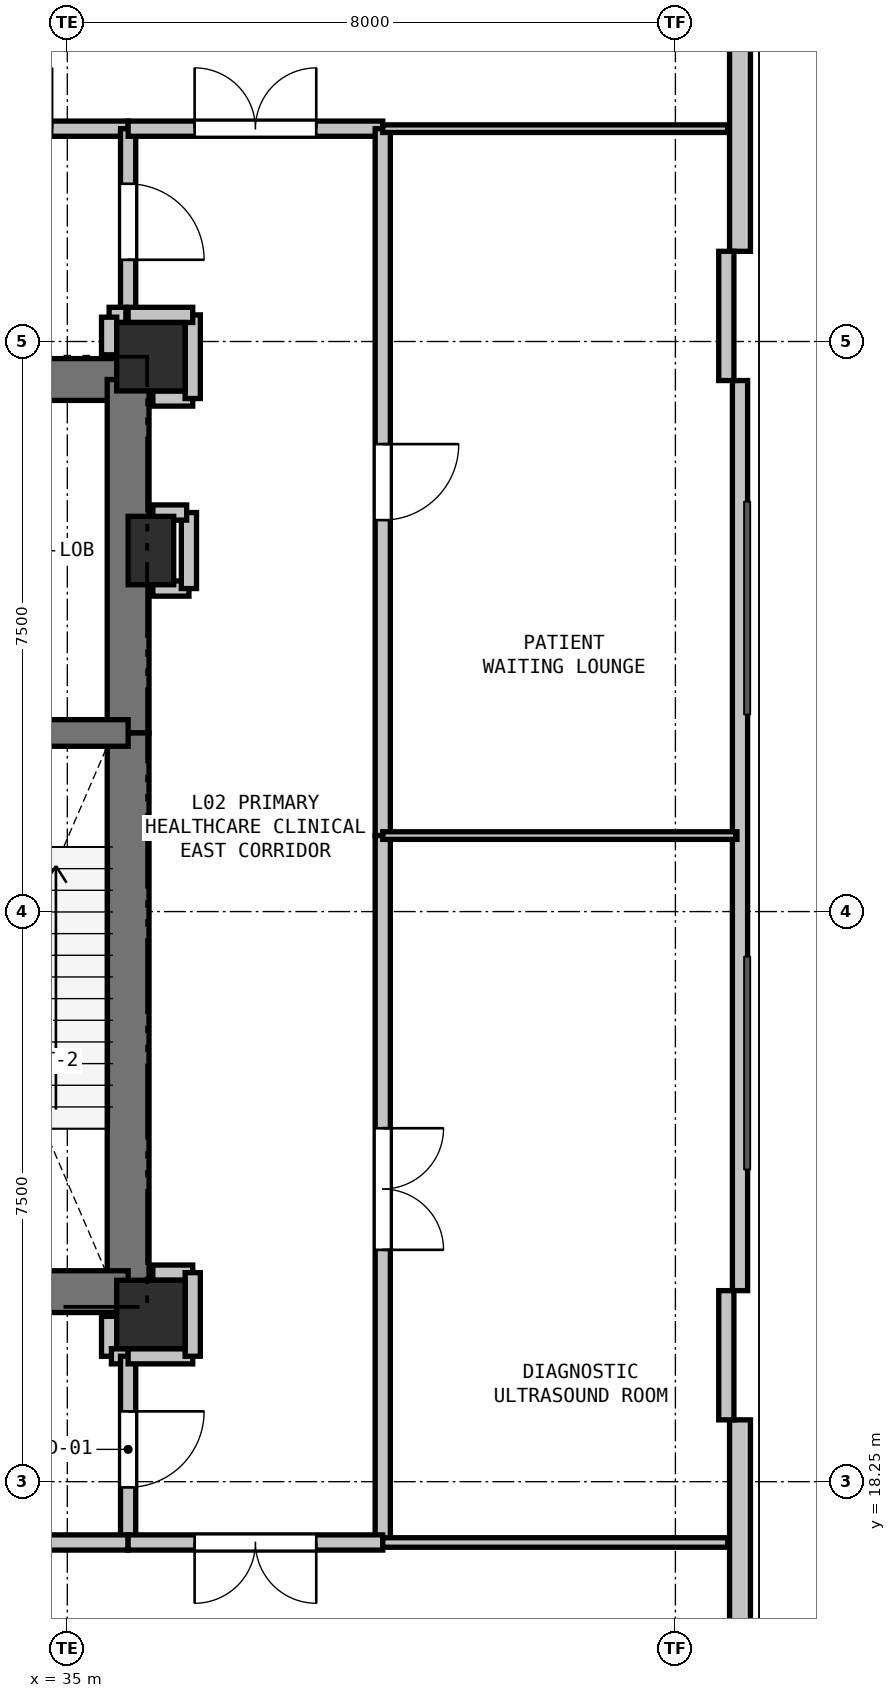
"""IFC4 building model, lengths in metres.
Left out: names, types, materials, properties, quantities, classifications, styles, units other than length and angle.
Written with IfcOpenShell. Run it as: python <this file> out.ifc"""

import sys

from ifc_helpers import new_model, si_unit, direction, frame, frame_2d, origin, origin_2d, place, context, subcontext, project, spatial, rectangle, extrude, element, fill, save


model = new_model("IFC4")
c1 = context("Model", 3, precision=1e-05, world=origin(), true_north=direction((0.0, 1.0)))
c2 = subcontext(c1, "Body", "Model", "MODEL_VIEW")
j1 = project(units=[si_unit("LENGTHUNIT", "METRE"), si_unit("PLANEANGLEUNIT", "RADIAN")], contexts=[c1])
p1 = place(None, origin())
s1 = spatial("IfcSite", under=j1, at=p1, CompositionType="ELEMENT")
p2 = place(p1, origin())
s2 = spatial("IfcBuilding", under=s1, at=p2, CompositionType="ELEMENT")
p3 = place(p2, frame((0.0, 0.0, 9.6)))
s3 = spatial("IfcBuildingStorey", under=s2, at=p3, CompositionType="ELEMENT", Elevation=9.6)
for number, where, z_axis, x_axis in (
    (1, (36.1, 33.05, 0.0), (0.0, 0.0, 1.0), (1.0, 0.0, 0.0)),
    (2, (36.1, 20.45, 0.0), (0.0, 0.0, 1.0), (1.0, 0.0, 0.0)),
):
    element("IfcColumn", number, at=place(p3, frame(where, z_axis=z_axis, x_axis=x_axis)), inside=s3, PredefinedType="COLUMN", context=c2, shape_type="SweptSolid", body=[
        extrude(rectangle(XDim=0.9, YDim=0.9, at=origin_2d()), origin(), (0.0, 0.0, 1.0), 4.8),
    ])
p4 = place(p3, frame((36.1, 30.5, 0.0), z_axis=(0.0, 0.0, 1.0), x_axis=(1.0, 0.0, 0.0)))
e3 = element("IfcColumn", 3, at=p4, inside=s3, PredefinedType="PILASTER", context=c2, shape_type="SweptSolid", body=[
    extrude(rectangle(XDim=0.6, YDim=0.9, at=origin_2d()), origin(), (0.0, 0.0, 1.0), 4.8),
])
p5 = place(p3, frame((43.85, 47.11, 0.0), z_axis=(0.0, 0.0, 1.0), x_axis=(0.0, -1.0, 0.0)))
e4 = element("IfcWall", 4, at=p5, inside=s3, PredefinedType="SOLIDWALL", context=c2, shape_type="SweptSolid", body=[
    extrude(rectangle(XDim=12.673, YDim=0.275, at=frame_2d((6.336, 0.0))), origin(), (0.0, 0.0, 1.0), 4.1),
])
p6 = place(p5, frame((7.973, 0.0, 0.9)))
e5 = element("IfcOpeningElement", 5, at=p6, cuts=e4, PredefinedType="OPENING", context=c2, shape_type="SweptSolid", body=[
    extrude(rectangle(XDim=1.6, YDim=1.8, at=frame_2d((0.8, 0.9))), frame((0.0, 0.147, 0.0), z_axis=(0.0, -1.0, 0.0), x_axis=(1.0, 0.0, 0.0)), (0.0, 0.0, 1.0), 0.295),
])
p7 = place(p3, frame((43.85, 32.737, 0.0), z_axis=(0.0, 0.0, 1.0), x_axis=(0.0, -1.0, 0.0)))
e6 = element("IfcWall", 6, at=p7, inside=s3, PredefinedType="PARAPET", context=c2, shape_type="SweptSolid", body=[
    extrude(rectangle(XDim=11.973, YDim=0.2, at=frame_2d((5.987, 0.0))), origin(), (0.0, 0.0, 1.0), 0.2),
])
p8 = place(p3, frame((43.85, 19.063, 0.0), z_axis=(0.0, 0.0, 1.0), x_axis=(0.0, -1.0, 0.0)))
e7 = element("IfcWall", 7, at=p8, inside=s3, PredefinedType="SOLIDWALL", context=c2, shape_type="SweptSolid", body=[
    extrude(rectangle(XDim=12.673, YDim=0.275, at=frame_2d((6.336, 0.0))), origin(), (0.0, 0.0, 1.0), 4.1),
])
p9 = place(p8, frame((2.988, 0.0, 0.9)))
e8 = element("IfcOpeningElement", 8, at=p9, cuts=e7, PredefinedType="OPENING", context=c2, shape_type="SweptSolid", body=[
    extrude(rectangle(XDim=2.0, YDim=1.8, at=frame_2d((1.0, 0.9))), frame((0.0, 0.147, 0.0), z_axis=(0.0, -1.0, 0.0), x_axis=(1.0, 0.0, 0.0)), (0.0, 0.0, 1.0), 0.295),
])
for number, where, z_axis, x_axis in (
    (9, (43.67, 34.437, 0.0), (0.0, 0.0, 1.0), (0.0, -1.0, 0.0)),
    (10, (43.67, 20.763, 0.0), (0.0, 0.0, 1.0), (0.0, -1.0, 0.0)),
):
    element("IfcWall", number, at=place(p3, frame(where, z_axis=z_axis, x_axis=x_axis)), inside=s3, PredefinedType="PARAPET", context=c2, shape_type="SweptSolid", body=[
        extrude(rectangle(XDim=1.7, YDim=0.2, at=frame_2d((0.85, 0.0))), origin(), (0.0, 0.0, 1.0), 4.1),
    ])
p10 = place(p3, frame((32.35, 32.75, 0.0), z_axis=(0.0, 0.0, 1.0), x_axis=(1.0, 0.0, 0.0)))
e11 = element("IfcWall", 11, at=p10, inside=s3, PredefinedType="SHEAR", context=c2, shape_type="SweptSolid", body=[
    extrude(rectangle(XDim=3.45, YDim=0.55, at=frame_2d((1.725, 0.0))), origin(), (0.0, 0.0, 1.0), 4.48),
])
p11 = place(p10, frame((0.65, 0.0, 0.0)))
e12 = element("IfcOpeningElement", 12, at=p11, cuts=e11, PredefinedType="OPENING", context=c2, shape_type="SweptSolid", body=[
    extrude(rectangle(XDim=1.15, YDim=2.15, at=frame_2d((0.575, 1.075))), frame((0.0, 0.285, 0.0), z_axis=(0.0, -1.0, 0.0), x_axis=(1.0, 0.0, 0.0)), (0.0, 0.0, 1.0), 0.57),
])
p12 = place(p3, frame((35.8, 32.75, 0.0), z_axis=(0.0, 0.0, 1.0), x_axis=(0.0, -1.0, 0.0)))
e13 = element("IfcWall", 13, at=p12, inside=s3, PredefinedType="SHEAR", context=c2, shape_type="SweptSolid", body=[
    extrude(rectangle(XDim=4.65, YDim=0.55, at=frame_2d((2.325, 0.0))), origin(), (0.0, 0.0, 1.0), 4.48),
])
p13 = place(p3, frame((35.8, 28.1, 0.0), z_axis=(0.0, 0.0, 1.0), x_axis=(0.0, -1.0, 0.0)))
e14 = element("IfcWall", 14, at=p13, inside=s3, PredefinedType="SHEAR", context=c2, shape_type="SweptSolid", body=[
    extrude(rectangle(XDim=7.35, YDim=0.55, at=frame_2d((3.675, 0.0))), origin(), (0.0, 0.0, 1.0), 4.48),
])
p14 = place(p3, frame((35.8, 20.75, 0.0), z_axis=(0.0, 0.0, 1.0), x_axis=(-1.0, 0.0, 0.0)))
e15 = element("IfcWall", 15, at=p14, inside=s3, PredefinedType="SHEAR", context=c2, shape_type="SweptSolid", body=[
    extrude(rectangle(XDim=3.45, YDim=0.55, at=frame_2d((1.725, 0.0))), origin(), (0.0, 0.0, 1.0), 4.48),
])
p15 = place(p3, frame((32.35, 28.1, 0.0), z_axis=(0.0, 0.0, 1.0), x_axis=(1.0, 0.0, 0.0)))
e16 = element("IfcWall", 16, at=p15, inside=s3, PredefinedType="SHEAR", context=c2, shape_type="SweptSolid", body=[
    extrude(rectangle(XDim=3.45, YDim=0.35, at=frame_2d((1.725, 0.0))), origin(), (0.0, 0.0, 1.0), 4.48),
])
p16 = place(p15, frame((1.15, 0.0, 0.0)))
e17 = element("IfcOpeningElement", 17, at=p16, cuts=e16, PredefinedType="OPENING", context=c2, shape_type="SweptSolid", body=[
    extrude(rectangle(XDim=1.15, YDim=2.15, at=frame_2d((0.575, 1.075))), frame((0.0, 0.185, 0.0), z_axis=(0.0, -1.0, 0.0), x_axis=(1.0, 0.0, 0.0)), (0.0, 0.0, 1.0), 0.37),
])
p17 = place(p3, frame((35.55, 20.425, 0.0), z_axis=(0.0, 0.0, 1.0), x_axis=(0.0, -1.0, 0.0)))
e18 = element("IfcWall", 18, at=p17, inside=s3, PredefinedType="PARTITIONING", context=c2, shape_type="SweptSolid", body=[
    extrude(rectangle(XDim=0.525, YDim=0.2, at=frame_2d((0.263, 0.0))), origin(), (0.0, 0.0, 1.0), 3.928),
])
p18 = place(p3, frame((35.58, 19.9, 0.0), z_axis=(0.0, 0.0, 1.0), x_axis=(1.0, 0.0, 0.0)))
e19 = element("IfcWall", 19, at=p18, inside=s3, PredefinedType="PARTITIONING", context=c2, shape_type="SweptSolid", body=[
    extrude(rectangle(XDim=0.22, YDim=0.2, at=frame_2d((0.11, 0.0))), origin(), (0.0, 0.0, 1.0), 4.48),
])
p19 = place(p3, frame((35.8, 19.9, 0.0), z_axis=(0.0, 0.0, 1.0), x_axis=(0.0, -1.0, 0.0)))
e20 = element("IfcWall", 20, at=p19, inside=s3, PredefinedType="PARTITIONING", context=c2, shape_type="SweptSolid", body=[
    extrude(rectangle(XDim=2.45, YDim=0.2, at=frame_2d((1.225, 0.0))), origin(), (0.0, 0.0, 1.0), 4.48),
])
p20 = place(p19, frame((0.725, 0.0, 0.0)))
e21 = element("IfcOpeningElement", 21, at=p20, cuts=e20, PredefinedType="OPENING", context=c2, shape_type="SweptSolid", body=[
    extrude(rectangle(XDim=1.0, YDim=2.15, at=frame_2d((0.5, 1.075))), frame((0.0, 0.11, 0.0), z_axis=(0.0, -1.0, 0.0), x_axis=(1.0, 0.0, 0.0)), (0.0, 0.0, 1.0), 0.22),
])
p21 = place(p3, frame((35.8, 17.45, 0.0), z_axis=(0.0, 0.0, 1.0), x_axis=(-1.0, 0.0, 0.0)))
e22 = element("IfcWall", 22, at=p21, inside=s3, PredefinedType="PARTITIONING", context=c2, shape_type="SweptSolid", body=[
    extrude(rectangle(XDim=4.3, YDim=0.2, at=frame_2d((2.15, 0.0))), origin(), (0.0, 0.0, 1.0), 4.48),
])
p22 = place(p21, frame((1.35, 0.0, 0.0)))
e23 = element("IfcOpeningElement", 23, at=p22, cuts=e22, PredefinedType="OPENING", context=c2, shape_type="SweptSolid", body=[
    extrude(rectangle(XDim=1.6, YDim=2.2, at=frame_2d((0.8, 1.1))), frame((0.0, 0.11, 0.0), z_axis=(0.0, -1.0, 0.0), x_axis=(1.0, 0.0, 0.0)), (0.0, 0.0, 1.0), 0.22),
])
p23 = place(p3, frame((32.2, 36.05, 0.0), z_axis=(0.0, 0.0, 1.0), x_axis=(1.0, 0.0, 0.0)))
e24 = element("IfcWall", 24, at=p23, inside=s3, PredefinedType="PARTITIONING", context=c2, shape_type="SweptSolid", body=[
    extrude(rectangle(XDim=3.6, YDim=0.2, at=frame_2d((1.8, 0.0))), origin(), (0.0, 0.0, 1.0), 4.48),
])
p24 = place(p23, frame((1.0, 0.0, 0.0)))
e25 = element("IfcOpeningElement", 25, at=p24, cuts=e24, PredefinedType="OPENING", context=c2, shape_type="SweptSolid", body=[
    extrude(rectangle(XDim=1.6, YDim=2.2, at=frame_2d((0.8, 1.1))), frame((0.0, 0.11, 0.0), z_axis=(0.0, -1.0, 0.0), x_axis=(1.0, 0.0, 0.0)), (0.0, 0.0, 1.0), 0.22),
])
p25 = place(p3, frame((35.8, 36.05, 0.0), z_axis=(0.0, 0.0, 1.0), x_axis=(0.0, -1.0, 0.0)))
e26 = element("IfcWall", 26, at=p25, inside=s3, PredefinedType="PARTITIONING", context=c2, shape_type="SweptSolid", body=[
    extrude(rectangle(XDim=2.45, YDim=0.2, at=frame_2d((1.225, 0.0))), origin(), (0.0, 0.0, 1.0), 4.48),
])
p26 = place(p25, frame((0.725, 0.0, 0.0)))
e27 = element("IfcOpeningElement", 27, at=p26, cuts=e26, PredefinedType="OPENING", context=c2, shape_type="SweptSolid", body=[
    extrude(rectangle(XDim=1.0, YDim=2.15, at=frame_2d((0.5, 1.075))), frame((0.0, 0.11, 0.0), z_axis=(0.0, -1.0, 0.0), x_axis=(1.0, 0.0, 0.0)), (0.0, 0.0, 1.0), 0.22),
])
p27 = place(p3, frame((35.77, 33.6, 0.0), z_axis=(0.0, 0.0, 1.0), x_axis=(-1.0, 0.0, 0.0)))
e28 = element("IfcWall", 28, at=p27, inside=s3, PredefinedType="PARTITIONING", context=c2, shape_type="SweptSolid", body=[
    extrude(rectangle(XDim=0.22, YDim=0.2, at=frame_2d((0.11, 0.0))), origin(), (0.0, 0.0, 1.0), 4.48),
])
p28 = place(p3, frame((35.55, 33.57, 0.0), z_axis=(0.0, 0.0, 1.0), x_axis=(0.0, -1.0, 0.0)))
e29 = element("IfcWall", 29, at=p28, inside=s3, PredefinedType="PARTITIONING", context=c2, shape_type="SweptSolid", body=[
    extrude(rectangle(XDim=0.495, YDim=0.2, at=frame_2d((0.248, 0.0))), origin(), (0.0, 0.0, 1.0), 3.928),
])
p29 = place(p3, frame((36.65, 21.0, 0.0), z_axis=(0.0, 0.0, 1.0), x_axis=(-1.0, 0.0, 0.0)))
e30 = element("IfcWall", 30, at=p29, inside=s3, PredefinedType="PARTITIONING", context=c2, shape_type="SweptSolid", body=[
    extrude(rectangle(XDim=0.525, YDim=0.2, at=frame_2d((0.262, 0.0))), origin(), (0.0, 0.0, 1.0), 3.928),
])
p30 = place(p3, frame((36.125, 30.0, 0.0), z_axis=(0.0, 0.0, 1.0), x_axis=(1.0, 0.0, 0.0)))
e31 = element("IfcWall", 31, at=p30, inside=s3, PredefinedType="PARTITIONING", context=c2, shape_type="SweptSolid", body=[
    extrude(rectangle(XDim=0.475, YDim=0.2, at=frame_2d((0.238, 0.0))), origin(), (0.0, 0.0, 1.0), 3.928),
])
p31 = place(p3, frame((36.6, 30.0, 0.0), z_axis=(0.0, 0.0, 1.0), x_axis=(0.0, 1.0, 0.0)))
e32 = element("IfcWall", 32, at=p31, inside=s3, PredefinedType="PARTITIONING", context=c2, shape_type="SweptSolid", body=[
    extrude(rectangle(XDim=1.0, YDim=0.2, at=frame_2d((0.5, 0.0))), origin(), (0.0, 0.0, 1.0), 4.48),
])
p32 = place(p3, frame((36.57, 31.0, 0.0), z_axis=(0.0, 0.0, 1.0), x_axis=(-1.0, 0.0, 0.0)))
e33 = element("IfcWall", 33, at=p32, inside=s3, PredefinedType="PARTITIONING", context=c2, shape_type="SweptSolid", body=[
    extrude(rectangle(XDim=0.445, YDim=0.2, at=frame_2d((0.223, 0.0))), origin(), (0.0, 0.0, 1.0), 3.928),
])
p33 = place(p3, frame((36.125, 32.5, 0.0), z_axis=(0.0, 0.0, 1.0), x_axis=(1.0, 0.0, 0.0)))
e34 = element("IfcWall", 34, at=p33, inside=s3, PredefinedType="PARTITIONING", context=c2, shape_type="SweptSolid", body=[
    extrude(rectangle(XDim=0.525, YDim=0.2, at=frame_2d((0.262, 0.0))), origin(), (0.0, 0.0, 1.0), 3.928),
])
p34 = place(p3, frame((36.65, 32.5, 0.0), z_axis=(0.0, 0.0, 1.0), x_axis=(0.0, 1.0, 0.0)))
e35 = element("IfcWall", 35, at=p34, inside=s3, PredefinedType="PARTITIONING", context=c2, shape_type="SweptSolid", body=[
    extrude(rectangle(XDim=1.1, YDim=0.2, at=frame_2d((0.55, 0.0))), origin(), (0.0, 0.0, 1.0), 3.777),
])
p35 = place(p3, frame((36.65, 33.6, 0.0), z_axis=(0.0, 0.0, 1.0), x_axis=(-1.0, 0.0, 0.0)))
e36 = element("IfcWall", 36, at=p35, inside=s3, PredefinedType="PARTITIONING", context=c2, shape_type="SweptSolid", body=[
    extrude(rectangle(XDim=0.85, YDim=0.2, at=frame_2d((0.425, 0.0))), origin(), (0.0, 0.0, 1.0), 3.777),
])
p36 = place(p3, frame((35.8, 36.05, 0.0), z_axis=(0.0, 0.0, 1.0), x_axis=(1.0, 0.0, 0.0)))
e37 = element("IfcWall", 37, at=p36, inside=s3, PredefinedType="PARTITIONING", context=c2, shape_type="SweptSolid", body=[
    extrude(rectangle(XDim=3.35, YDim=0.2, at=frame_2d((1.675, 0.0))), origin(), (0.0, 0.0, 1.0), 3.777),
])
p37 = place(p36, frame((0.875, 0.0, 0.0)))
e38 = element("IfcOpeningElement", 38, at=p37, cuts=e37, PredefinedType="OPENING", context=c2, shape_type="SweptSolid", body=[
    extrude(rectangle(XDim=1.6, YDim=2.2, at=frame_2d((0.8, 1.1))), frame((0.0, 0.11, 0.0), z_axis=(0.0, -1.0, 0.0), x_axis=(1.0, 0.0, 0.0)), (0.0, 0.0, 1.0), 0.22),
])
p38 = place(p3, frame((39.15, 36.05, 0.0), z_axis=(0.0, 0.0, 1.0), x_axis=(0.0, -1.0, 0.0)))
e39 = element("IfcWall", 39, at=p38, inside=s3, PredefinedType="PARTITIONING", context=c2, shape_type="SweptSolid", body=[
    extrude(rectangle(XDim=9.3, YDim=0.2, at=frame_2d((4.65, 0.0))), origin(), (0.0, 0.0, 1.0), 4.48),
])
p39 = place(p38, frame((4.15, 0.0, 0.0)))
e40 = element("IfcOpeningElement", 40, at=p39, cuts=e39, PredefinedType="OPENING", context=c2, shape_type="SweptSolid", body=[
    extrude(rectangle(XDim=1.0, YDim=2.15, at=frame_2d((0.5, 1.075))), frame((0.0, 0.11, 0.0), z_axis=(0.0, -1.0, 0.0), x_axis=(1.0, 0.0, 0.0)), (0.0, 0.0, 1.0), 0.22),
])
p40 = place(p3, frame((39.15, 26.75, 0.0), z_axis=(0.0, 0.0, 1.0), x_axis=(0.0, -1.0, 0.0)))
e41 = element("IfcWall", 41, at=p40, inside=s3, PredefinedType="PARTITIONING", context=c2, shape_type="SweptSolid", body=[
    extrude(rectangle(XDim=9.3, YDim=0.2, at=frame_2d((4.65, 0.0))), origin(), (0.0, 0.0, 1.0), 4.48),
])
p41 = place(p40, frame((3.85, 0.0, 0.0)))
e42 = element("IfcOpeningElement", 42, at=p41, cuts=e41, PredefinedType="OPENING", context=c2, shape_type="SweptSolid", body=[
    extrude(rectangle(XDim=1.6, YDim=2.2, at=frame_2d((0.8, 1.1))), frame((0.0, 0.11, 0.0), z_axis=(0.0, -1.0, 0.0), x_axis=(1.0, 0.0, 0.0)), (0.0, 0.0, 1.0), 0.22),
])
p42 = place(p3, frame((39.15, 17.45, 0.0), z_axis=(0.0, 0.0, 1.0), x_axis=(-1.0, 0.0, 0.0)))
e43 = element("IfcWall", 43, at=p42, inside=s3, PredefinedType="PARTITIONING", context=c2, shape_type="SweptSolid", body=[
    extrude(rectangle(XDim=3.35, YDim=0.2, at=frame_2d((1.675, 0.0))), origin(), (0.0, 0.0, 1.0), 3.777),
])
p43 = place(p42, frame((0.875, 0.0, 0.0)))
e44 = element("IfcOpeningElement", 44, at=p43, cuts=e43, PredefinedType="OPENING", context=c2, shape_type="SweptSolid", body=[
    extrude(rectangle(XDim=1.6, YDim=2.2, at=frame_2d((0.8, 1.1))), frame((0.0, 0.11, 0.0), z_axis=(0.0, -1.0, 0.0), x_axis=(1.0, 0.0, 0.0)), (0.0, 0.0, 1.0), 0.22),
])
p44 = place(p3, frame((35.8, 19.9, 0.0), z_axis=(0.0, 0.0, 1.0), x_axis=(1.0, 0.0, 0.0)))
e45 = element("IfcWall", 45, at=p44, inside=s3, PredefinedType="PARTITIONING", context=c2, shape_type="SweptSolid", body=[
    extrude(rectangle(XDim=0.85, YDim=0.2, at=frame_2d((0.425, 0.0))), origin(), (0.0, 0.0, 1.0), 3.777),
])
p45 = place(p3, frame((36.65, 19.9, 0.0), z_axis=(0.0, 0.0, 1.0), x_axis=(0.0, 1.0, 0.0)))
e46 = element("IfcWall", 46, at=p45, inside=s3, PredefinedType="PARTITIONING", context=c2, shape_type="SweptSolid", body=[
    extrude(rectangle(XDim=1.1, YDim=0.2, at=frame_2d((0.55, 0.0))), origin(), (0.0, 0.0, 1.0), 4.48),
])
p46 = place(p3, frame((43.688, 36.05, 0.0), z_axis=(0.0, 0.0, 1.0), x_axis=(-1.0, 0.0, 0.0)))
e47 = element("IfcWall", 47, at=p46, inside=s3, PredefinedType="PARTITIONING", context=c2, shape_type="SweptSolid", body=[
    extrude(rectangle(XDim=4.539, YDim=0.1, at=frame_2d((2.269, 0.0))), origin(), (0.0, 0.0, 1.0), 4.09),
])
p47 = place(p3, frame((43.81, 26.75, 0.0), z_axis=(0.0, 0.0, 1.0), x_axis=(-1.0, 0.0, 0.0)))
e48 = element("IfcWall", 48, at=p47, inside=s3, PredefinedType="PARTITIONING", context=c2, shape_type="SweptSolid", body=[
    extrude(rectangle(XDim=4.66, YDim=0.1, at=frame_2d((2.33, 0.0))), origin(), (0.0, 0.0, 1.0), 4.09),
])
p48 = place(p3, frame((43.688, 17.45, 0.0), z_axis=(0.0, 0.0, 1.0), x_axis=(-1.0, 0.0, 0.0)))
e49 = element("IfcWall", 49, at=p48, inside=s3, PredefinedType="PARTITIONING", context=c2, shape_type="SweptSolid", body=[
    extrude(rectangle(XDim=4.539, YDim=0.125, at=frame_2d((2.269, 0.0))), origin(), (0.0, 0.0, 1.0), 4.09),
])
p49 = place(p20, origin())
e50 = element("IfcDoor", 50, at=p49, inside=s3, OperationType="SINGLE_SWING_LEFT", PredefinedType="DOOR", context=c2, shape_type="SweptSolid", body=[
    extrude(rectangle(XDim=1.0, YDim=2.15, at=frame_2d((0.5, 1.075))), frame((0.0, 0.025, 0.0), z_axis=(0.0, -1.0, 0.0), x_axis=(1.0, 0.0, 0.0)), (0.0, 0.0, 1.0), 0.05),
])
fill(e21, e50)
p50 = place(p26, origin())
e51 = element("IfcDoor", 51, at=p50, inside=s3, OperationType="SINGLE_SWING_RIGHT", PredefinedType="DOOR", context=c2, shape_type="SweptSolid", body=[
    extrude(rectangle(XDim=1.0, YDim=2.15, at=frame_2d((0.5, 1.075))), frame((0.0, 0.025, 0.0), z_axis=(0.0, -1.0, 0.0), x_axis=(1.0, 0.0, 0.0)), (0.0, 0.0, 1.0), 0.05),
])
fill(e27, e51)
p51 = place(p37, origin())
e52 = element("IfcDoor", 52, at=p51, inside=s3, OperationType="DOUBLE_DOOR_SINGLE_SWING", PredefinedType="DOOR", context=c2, shape_type="SweptSolid", body=[
    extrude(rectangle(XDim=1.6, YDim=2.2, at=frame_2d((0.8, 1.1))), frame((0.0, 0.025, 0.0), z_axis=(0.0, -1.0, 0.0), x_axis=(1.0, 0.0, 0.0)), (0.0, 0.0, 1.0), 0.05),
])
fill(e38, e52)
p52 = place(p39, origin())
e53 = element("IfcDoor", 53, at=p52, inside=s3, OperationType="SINGLE_SWING_LEFT", PredefinedType="DOOR", context=c2, shape_type="SweptSolid", body=[
    extrude(rectangle(XDim=1.0, YDim=2.15, at=frame_2d((0.5, 1.075))), frame((0.0, 0.025, 0.0), z_axis=(0.0, -1.0, 0.0), x_axis=(1.0, 0.0, 0.0)), (0.0, 0.0, 1.0), 0.05),
])
fill(e40, e53)
p53 = place(p41, origin())
e54 = element("IfcDoor", 54, at=p53, inside=s3, OperationType="DOUBLE_DOOR_SINGLE_SWING", PredefinedType="DOOR", context=c2, shape_type="SweptSolid", body=[
    extrude(rectangle(XDim=1.6, YDim=2.2, at=frame_2d((0.8, 1.1))), frame((0.0, 0.025, 0.0), z_axis=(0.0, -1.0, 0.0), x_axis=(1.0, 0.0, 0.0)), (0.0, 0.0, 1.0), 0.05),
])
fill(e42, e54)
p54 = place(p43, origin())
e55 = element("IfcDoor", 55, at=p54, inside=s3, OperationType="DOUBLE_DOOR_SINGLE_SWING", PredefinedType="DOOR", context=c2, shape_type="SweptSolid", body=[
    extrude(rectangle(XDim=1.6, YDim=2.2, at=frame_2d((0.8, 1.1))), frame((0.0, 0.025, 0.0), z_axis=(0.0, -1.0, 0.0), x_axis=(1.0, 0.0, 0.0)), (0.0, 0.0, 1.0), 0.05),
])
fill(e44, e55)
save(model, sys.argv[1])
